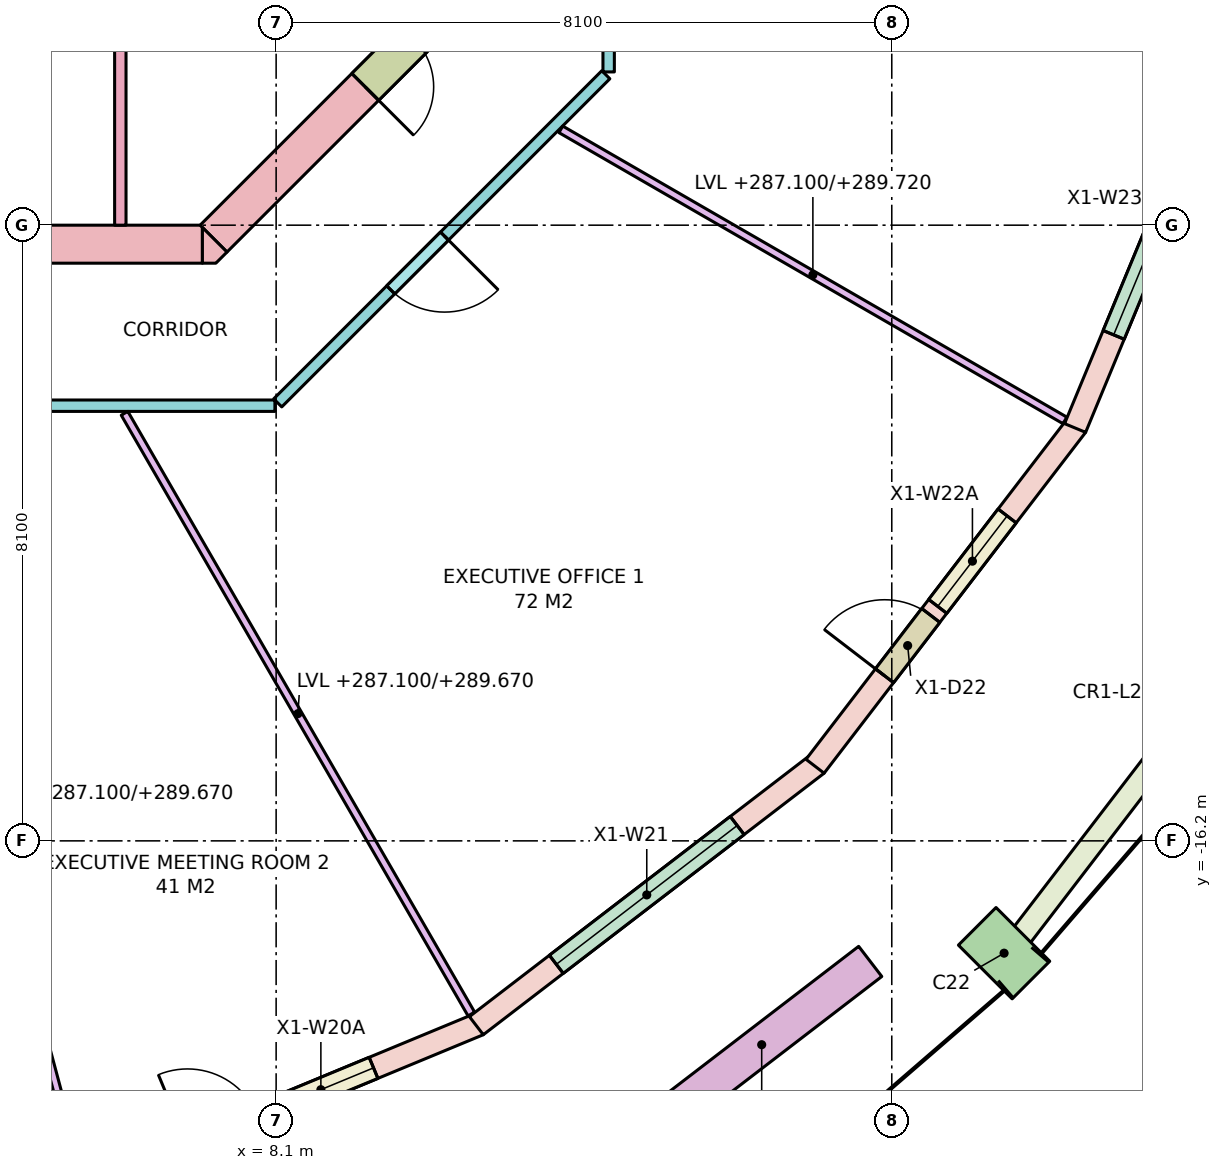
"""IFC4 building model, lengths in metres.
Left out: names, types, materials, properties, quantities, classifications, styles, units other than length and angle.
Written with IfcOpenShell. Run it as: python <this file> out.ifc"""

import sys

from ifc_helpers import new_model, si_unit, direction, frame, frame_2d, origin, origin_2d, place, context, subcontext, project, spatial, polyline, rectangle, outline, extrude, element, fill, save


model = new_model("IFC4")
c1 = context("Model", 3, precision=1e-05, world=origin(), true_north=direction((0.0, 1.0)))
c2 = subcontext(c1, "Body", "Model", "MODEL_VIEW")
j1 = project(units=[si_unit("LENGTHUNIT", "METRE"), si_unit("PLANEANGLEUNIT", "RADIAN")], contexts=[c1])
p1 = place(None, origin())
s1 = spatial("IfcSite", under=j1, at=p1, CompositionType="ELEMENT")
p2 = place(p1, origin())
s2 = spatial("IfcBuilding", under=s1, at=p2, CompositionType="ELEMENT")
p3 = place(p2, frame((0.0, 0.0, 287.1)))
s3 = spatial("IfcBuildingStorey", under=s2, at=p3, CompositionType="ELEMENT", Elevation=287.1)
p4 = place(p3, frame((17.678, -17.678, 0.0), z_axis=(0.0, 0.0, 1.0), x_axis=(0.707106781187, 0.707106781187, 0.0)))
e1 = element("IfcColumn", 1, at=p4, inside=s3, PredefinedType="COLUMN", context=c2, shape_type="SweptSolid", body=[
    extrude(rectangle(XDim=0.7, YDim=1.0, at=origin_2d()), origin(), (0.0, 0.0, 1.0), 3.7),
])
p5 = place(p3, frame((-7.13, -8.35, -0.28), z_axis=(0.0, 0.0, 1.0), x_axis=(1.0, 0.0, 0.0)))
e2 = element("IfcWall", 2, at=p5, inside=s3, PredefinedType="SHEAR", context=c2, shape_type="SweptSolid", body=[
    extrude(rectangle(XDim=14.26, YDim=0.5, at=frame_2d((7.13, 0.0))), origin(), (0.0, 0.0, 1.0), 3.7),
])
p6 = place(p5, frame((8.08, 0.0, 0.28)))
e3 = element("IfcOpeningElement", 3, at=p6, cuts=e2, PredefinedType="OPENING", context=c2, shape_type="SweptSolid", body=[
    extrude(rectangle(XDim=0.7, YDim=2.1, at=frame_2d((0.35, 1.05))), frame((0.0, 0.26, 0.0), z_axis=(0.0, -1.0, 0.0), x_axis=(1.0, 0.0, 0.0)), (0.0, 0.0, 1.0), 0.52),
])
p7 = place(p5, frame((6.205, 0.0, 0.28)))
e4 = element("IfcOpeningElement", 4, at=p7, cuts=e2, PredefinedType="OPENING", context=c2, shape_type="SweptSolid", body=[
    extrude(rectangle(XDim=0.9, YDim=2.1, at=frame_2d((0.45, 1.05))), frame((0.0, 0.26, 0.0), z_axis=(0.0, -1.0, 0.0), x_axis=(1.0, 0.0, 0.0)), (0.0, 0.0, 1.0), 0.52),
])
p8 = place(p5, frame((10.667, 0.0, 0.28)))
e5 = element("IfcOpeningElement", 5, at=p8, cuts=e2, PredefinedType="OPENING", context=c2, shape_type="SweptSolid", body=[
    extrude(rectangle(XDim=0.9, YDim=2.1, at=frame_2d((0.45, 1.05))), frame((0.0, 0.26, 0.0), z_axis=(0.0, -1.0, 0.0), x_axis=(1.0, 0.0, 0.0)), (0.0, 0.0, 1.0), 0.52),
])
p9 = place(p3, frame((10.277, -5.277, -0.28), z_axis=(0.0, 0.0, 1.0), x_axis=(-0.707106781187, -0.707106781187, 0.0)))
e6 = element("IfcWall", 6, at=p9, inside=s3, PredefinedType="SHEAR", context=c2, shape_type="SweptSolid", body=[
    extrude(rectangle(XDim=4.243, YDim=0.5, at=frame_2d((2.121, 0.0))), origin(), (0.0, 0.0, 1.0), 3.7),
])
p10 = place(p9, frame((0.52, 0.0, 0.28)))
e7 = element("IfcOpeningElement", 7, at=p10, cuts=e6, PredefinedType="OPENING", context=c2, shape_type="SweptSolid", body=[
    extrude(rectangle(XDim=0.9, YDim=2.1, at=frame_2d((0.45, 1.05))), frame((0.0, 0.26, 0.0), z_axis=(0.0, -1.0, 0.0), x_axis=(1.0, 0.0, 0.0)), (0.0, 0.0, 1.0), 0.52),
])
p11 = place(p3, frame((0.0, 0.0, -0.28)))
e8 = element("IfcWall", 8, at=p11, inside=s3, PredefinedType="SHEAR", context=c2, shape_type="SweptSolid", body=[
    extrude(outline(polyline([(7.307, -8.6), (7.13, -8.6), (7.13, -8.13), (7.454, -8.454), (7.307, -8.6)])), origin(), (0.0, 0.0, 1.0), 3.7),
])
p12 = place(p3, frame((5.546, -20.775, 0.0), z_axis=(0.0, 0.0, 1.0), x_axis=(0.923888907244, 0.382660798975, 0.0)))
e9 = element("IfcWall", 9, at=p12, inside=s3, PredefinedType="STANDARD", context=c2, shape_type="SweptSolid", body=[
    extrude(rectangle(XDim=5.652, YDim=0.3, at=frame_2d((2.826, 0.0))), origin(), (0.0, 0.0, 1.0), 3.42),
])
p13 = place(p12, frame((1.501, 0.0, 0.0)))
e10 = element("IfcOpeningElement", 10, at=p13, cuts=e9, PredefinedType="OPENING", context=c2, shape_type="SweptSolid", body=[
    extrude(rectangle(XDim=1.0, YDim=2.4, at=frame_2d((0.5, 1.2))), frame((0.0, 0.16, 0.0), z_axis=(0.0, -1.0, 0.0), x_axis=(1.0, 0.0, 0.0)), (0.0, 0.0, 1.0), 0.32),
])
p14 = place(p12, frame((2.651, 0.0, 0.8)))
e11 = element("IfcOpeningElement", 11, at=p14, cuts=e9, PredefinedType="OPENING", context=c2, shape_type="SweptSolid", body=[
    extrude(rectangle(XDim=1.5, YDim=2.4, at=frame_2d((0.75, 1.2))), frame((0.0, 0.16, 0.0), z_axis=(0.0, -1.0, 0.0), x_axis=(1.0, 0.0, 0.0)), (0.0, 0.0, 1.0), 0.32),
])
p15 = place(p3, frame((10.734, -18.632, 0.0), z_axis=(0.0, 0.0, 1.0), x_axis=(0.793363662257, 0.608747976925, 0.0)))
e12 = element("IfcWall", 12, at=p15, inside=s3, PredefinedType="STANDARD", context=c2, shape_type="SweptSolid", body=[
    extrude(rectangle(XDim=5.652, YDim=0.3, at=frame_2d((2.826, 0.0))), origin(), (0.0, 0.0, 1.0), 3.42),
])
p16 = place(p15, frame((1.326, 0.0, 0.8)))
e13 = element("IfcOpeningElement", 13, at=p16, cuts=e12, PredefinedType="OPENING", context=c2, shape_type="SweptSolid", body=[
    extrude(rectangle(XDim=3.0, YDim=2.4, at=frame_2d((1.5, 1.2))), frame((0.0, 0.16, 0.0), z_axis=(0.0, -1.0, 0.0), x_axis=(1.0, 0.0, 0.0)), (0.0, 0.0, 1.0), 0.32),
])
p17 = place(p3, frame((15.191, -15.219, 0.0), z_axis=(0.0, 0.0, 1.0), x_axis=(0.608747976925, 0.793363662257, 0.0)))
e14 = element("IfcWall", 14, at=p17, inside=s3, PredefinedType="STANDARD", context=c2, shape_type="SweptSolid", body=[
    extrude(rectangle(XDim=5.652, YDim=0.3, at=frame_2d((2.826, 0.0))), origin(), (0.0, 0.0, 1.0), 3.42),
])
p18 = place(p17, frame((1.501, 0.0, 0.0)))
e15 = element("IfcOpeningElement", 15, at=p18, cuts=e14, PredefinedType="OPENING", context=c2, shape_type="SweptSolid", body=[
    extrude(rectangle(XDim=1.0, YDim=2.4, at=frame_2d((0.5, 1.2))), frame((0.0, 0.16, 0.0), z_axis=(0.0, -1.0, 0.0), x_axis=(1.0, 0.0, 0.0)), (0.0, 0.0, 1.0), 0.32),
])
p19 = place(p17, frame((2.651, 0.0, 0.8)))
e16 = element("IfcOpeningElement", 16, at=p19, cuts=e14, PredefinedType="OPENING", context=c2, shape_type="SweptSolid", body=[
    extrude(rectangle(XDim=1.5, YDim=2.4, at=frame_2d((0.75, 1.2))), frame((0.0, 0.16, 0.0), z_axis=(0.0, -1.0, 0.0), x_axis=(1.0, 0.0, 0.0)), (0.0, 0.0, 1.0), 0.32),
])
p20 = place(p3, frame((18.612, -10.768, 0.0), z_axis=(0.0, 0.0, 1.0), x_axis=(0.382660798975, 0.923888907244, 0.0)))
e17 = element("IfcWall", 17, at=p20, inside=s3, PredefinedType="STANDARD", context=c2, shape_type="SweptSolid", body=[
    extrude(rectangle(XDim=5.652, YDim=0.3, at=frame_2d((2.826, 0.0))), origin(), (0.0, 0.0, 1.0), 3.42),
])
p21 = place(p20, frame((1.326, 0.0, 0.8)))
e18 = element("IfcOpeningElement", 18, at=p21, cuts=e17, PredefinedType="OPENING", context=c2, shape_type="SweptSolid", body=[
    extrude(rectangle(XDim=3.0, YDim=2.4, at=frame_2d((1.5, 1.2))), frame((0.0, 0.16, 0.0), z_axis=(0.0, -1.0, 0.0), x_axis=(1.0, 0.0, 0.0)), (0.0, 0.0, 1.0), 0.32),
])
p22 = place(p3, frame((13.061, -19.978, 0.0), z_axis=(0.0, 0.0, 1.0), x_axis=(0.793326845617, 0.608795955984, 0.0)))
e19 = element("IfcWall", 19, at=p22, inside=s3, PredefinedType="PARAPET", context=c2, shape_type="SweptSolid", body=[
    extrude(rectangle(XDim=3.6, YDim=0.5, at=frame_2d((1.8, 0.0))), origin(), (0.0, 0.0, 1.0), 0.9),
])
p23 = place(p3, frame((6.05, -8.1, 0.0), z_axis=(0.0, 0.0, 1.0), x_axis=(0.0, 1.0, 0.0)))
e20 = element("IfcWall", 20, at=p23, inside=s3, PredefinedType="PARTITIONING", context=c2, shape_type="SweptSolid", body=[
    extrude(rectangle(XDim=3.6, YDim=0.15, at=frame_2d((1.8, 0.0))), origin(), (0.0, 0.0, 1.0), 3.42),
])
p24 = place(p3, frame((12.438, -6.121, 0.0), z_axis=(0.0, 0.0, 1.0), x_axis=(-0.707106781187, -0.707106781187, 0.0)))
e21 = element("IfcWall", 21, at=p24, inside=s3, PredefinedType="PARTITIONING", context=c2, shape_type="SweptSolid", body=[
    extrude(rectangle(XDim=6.105, YDim=0.15, at=frame_2d((3.053, 0.0))), origin(), (0.0, 0.0, 1.0), 2.57),
])
p25 = place(p24, frame((3.002, 0.0, 0.0)))
e22 = element("IfcOpeningElement", 22, at=p25, cuts=e21, PredefinedType="OPENING", context=c2, shape_type="SweptSolid", body=[
    extrude(rectangle(XDim=1.0, YDim=2.1, at=frame_2d((0.5, 1.05))), frame((0.0, 0.085, 0.0), z_axis=(0.0, -1.0, 0.0), x_axis=(1.0, 0.0, 0.0)), (0.0, 0.0, 1.0), 0.17),
])
p26 = place(p3, frame((8.084, -10.475, 0.0), z_axis=(0.0, 0.0, 1.0), x_axis=(-1.0, 0.0, 0.0)))
e23 = element("IfcWall", 23, at=p26, inside=s3, PredefinedType="PARTITIONING", context=c2, shape_type="SweptSolid", body=[
    extrude(rectangle(XDim=16.167, YDim=0.15, at=frame_2d((8.084, 0.0))), origin(), (0.0, 0.0, 1.0), 2.57),
])
p27 = place(p26, frame((12.065, 0.0, 0.0)))
e24 = element("IfcOpeningElement", 24, at=p27, cuts=e23, PredefinedType="OPENING", context=c2, shape_type="SweptSolid", body=[
    extrude(rectangle(XDim=0.9, YDim=2.1, at=frame_2d((0.45, 1.05))), frame((0.0, 0.085, 0.0), z_axis=(0.0, -1.0, 0.0), x_axis=(1.0, 0.0, 0.0)), (0.0, 0.0, 1.0), 0.17),
])
p28 = place(p26, frame((7.584, 0.0, 0.0)))
e25 = element("IfcOpeningElement", 25, at=p28, cuts=e23, PredefinedType="OPENING", context=c2, shape_type="SweptSolid", body=[
    extrude(rectangle(XDim=1.0, YDim=2.1, at=frame_2d((0.5, 1.05))), frame((0.0, 0.085, 0.0), z_axis=(0.0, -1.0, 0.0), x_axis=(1.0, 0.0, 0.0)), (0.0, 0.0, 1.0), 0.17),
])
p29 = place(p26, frame((3.153, 0.0, 0.0)))
e26 = element("IfcOpeningElement", 26, at=p29, cuts=e23, PredefinedType="OPENING", context=c2, shape_type="SweptSolid", body=[
    extrude(rectangle(XDim=1.0, YDim=2.1, at=frame_2d((0.5, 1.05))), frame((0.0, 0.085, 0.0), z_axis=(0.0, -1.0, 0.0), x_axis=(1.0, 0.0, 0.0)), (0.0, 0.0, 1.0), 0.17),
])
p30 = place(p3, frame((12.475, 6.084, 0.0), z_axis=(0.0, 0.0, 1.0), x_axis=(0.0, -1.0, 0.0)))
e27 = element("IfcWall", 27, at=p30, inside=s3, PredefinedType="PARTITIONING", context=c2, shape_type="SweptSolid", body=[
    extrude(rectangle(XDim=12.167, YDim=0.15, at=frame_2d((6.084, 0.0))), origin(), (0.0, 0.0, 1.0), 2.92),
])
p31 = place(p30, frame((8.601, 0.0, 0.0)))
e28 = element("IfcOpeningElement", 28, at=p31, cuts=e27, PredefinedType="OPENING", context=c2, shape_type="SweptSolid", body=[
    extrude(rectangle(XDim=1.0, YDim=2.1, at=frame_2d((0.5, 1.05))), frame((0.0, 0.085, 0.0), z_axis=(0.0, -1.0, 0.0), x_axis=(1.0, 0.0, 0.0)), (0.0, 0.0, 1.0), 0.17),
])
p32 = place(p30, frame((2.167, 0.0, 0.0)))
e29 = element("IfcOpeningElement", 29, at=p32, cuts=e27, PredefinedType="OPENING", context=c2, shape_type="SweptSolid", body=[
    extrude(rectangle(XDim=1.8, YDim=2.1, at=frame_2d((0.9, 1.05))), frame((0.0, 0.085, 0.0), z_axis=(0.0, -1.0, 0.0), x_axis=(1.0, 0.0, 0.0)), (0.0, 0.0, 1.0), 0.17),
])
p33 = place(p3, frame((2.831, -10.564, 0.0), z_axis=(0.0, 0.0, 1.0), x_axis=(0.258796321138, -0.965931914871, 0.0)))
e30 = element("IfcWall", 30, at=p33, inside=s3, PredefinedType="PARTITIONING", context=c2, shape_type="SweptSolid", body=[
    extrude(rectangle(XDim=10.4, YDim=0.1, at=frame_2d((5.2, 0.0))), origin(), (0.0, 0.0, 1.0), 2.57),
])
p34 = place(p3, frame((6.105, -10.575, 0.0), z_axis=(0.0, 0.0, 1.0), x_axis=(0.500020406621, -0.866013621696, 0.0)))
e31 = element("IfcWall", 31, at=p34, inside=s3, PredefinedType="PARTITIONING", context=c2, shape_type="SweptSolid", body=[
    extrude(rectangle(XDim=9.126, YDim=0.1, at=frame_2d((4.563, 0.0))), origin(), (0.0, 0.0, 1.0), 2.57),
])
p35 = place(p3, frame((11.846, -6.839, 0.0), z_axis=(0.0, 0.0, 1.0), x_axis=(0.866007734672, -0.500030602552, 0.0)))
e32 = element("IfcWall", 32, at=p35, inside=s3, PredefinedType="PARTITIONING", context=c2, shape_type="SweptSolid", body=[
    extrude(rectangle(XDim=7.658, YDim=0.1, at=frame_2d((3.829, 0.0))), origin(), (0.0, 0.0, 1.0), 2.62),
])
p36 = place(p14, origin())
e33 = element("IfcWindow", 33, at=p36, inside=s3, PartitioningType="SINGLE_PANEL", PredefinedType="WINDOW", context=c2, shape_type="SweptSolid", body=[
    extrude(rectangle(XDim=1.5, YDim=2.4, at=frame_2d((0.75, 1.2))), frame((0.0, 0.03, 0.0), z_axis=(0.0, -1.0, 0.0), x_axis=(1.0, 0.0, 0.0)), (0.0, 0.0, 1.0), 0.06),
])
fill(e11, e33)
p37 = place(p16, origin())
e34 = element("IfcWindow", 34, at=p37, inside=s3, PartitioningType="SINGLE_PANEL", PredefinedType="WINDOW", context=c2, shape_type="SweptSolid", body=[
    extrude(rectangle(XDim=3.0, YDim=2.4, at=frame_2d((1.5, 1.2))), frame((0.0, 0.03, 0.0), z_axis=(0.0, -1.0, 0.0), x_axis=(1.0, 0.0, 0.0)), (0.0, 0.0, 1.0), 0.06),
])
fill(e13, e34)
p38 = place(p18, origin())
e35 = element("IfcDoor", 35, at=p38, inside=s3, OperationType="SINGLE_SWING_LEFT", PredefinedType="DOOR", context=c2, shape_type="SweptSolid", body=[
    extrude(rectangle(XDim=1.0, YDim=2.4, at=frame_2d((0.5, 1.2))), frame((0.0, 0.025, 0.0), z_axis=(0.0, -1.0, 0.0), x_axis=(1.0, 0.0, 0.0)), (0.0, 0.0, 1.0), 0.05),
])
fill(e15, e35)
p39 = place(p19, origin())
e36 = element("IfcWindow", 36, at=p39, inside=s3, PartitioningType="SINGLE_PANEL", PredefinedType="WINDOW", context=c2, shape_type="SweptSolid", body=[
    extrude(rectangle(XDim=1.5, YDim=2.4, at=frame_2d((0.75, 1.2))), frame((0.0, 0.03, 0.0), z_axis=(0.0, -1.0, 0.0), x_axis=(1.0, 0.0, 0.0)), (0.0, 0.0, 1.0), 0.06),
])
fill(e16, e36)
p40 = place(p21, origin())
e37 = element("IfcWindow", 37, at=p40, inside=s3, PartitioningType="SINGLE_PANEL", PredefinedType="WINDOW", context=c2, shape_type="SweptSolid", body=[
    extrude(rectangle(XDim=3.0, YDim=2.4, at=frame_2d((1.5, 1.2))), frame((0.0, 0.03, 0.0), z_axis=(0.0, -1.0, 0.0), x_axis=(1.0, 0.0, 0.0)), (0.0, 0.0, 1.0), 0.06),
])
fill(e18, e37)
p41 = place(p10, origin())
e38 = element("IfcDoor", 38, at=p41, inside=s3, OperationType="SINGLE_SWING_RIGHT", PredefinedType="DOOR", context=c2, shape_type="SweptSolid", body=[
    extrude(rectangle(XDim=0.9, YDim=2.1, at=frame_2d((0.45, 1.05))), frame((0.0, 0.025, 0.0), z_axis=(0.0, -1.0, 0.0), x_axis=(1.0, 0.0, 0.0)), (0.0, 0.0, 1.0), 0.05),
])
fill(e7, e38)
p42 = place(p25, origin())
e39 = element("IfcDoor", 39, at=p42, inside=s3, OperationType="SINGLE_SWING_LEFT", PredefinedType="DOOR", context=c2, shape_type="SweptSolid", body=[
    extrude(rectangle(XDim=1.0, YDim=2.1, at=frame_2d((0.5, 1.05))), frame((0.0, 0.025, 0.0), z_axis=(0.0, -1.0, 0.0), x_axis=(1.0, 0.0, 0.0)), (0.0, 0.0, 1.0), 0.05),
])
fill(e22, e39)
save(model, sys.argv[1])
